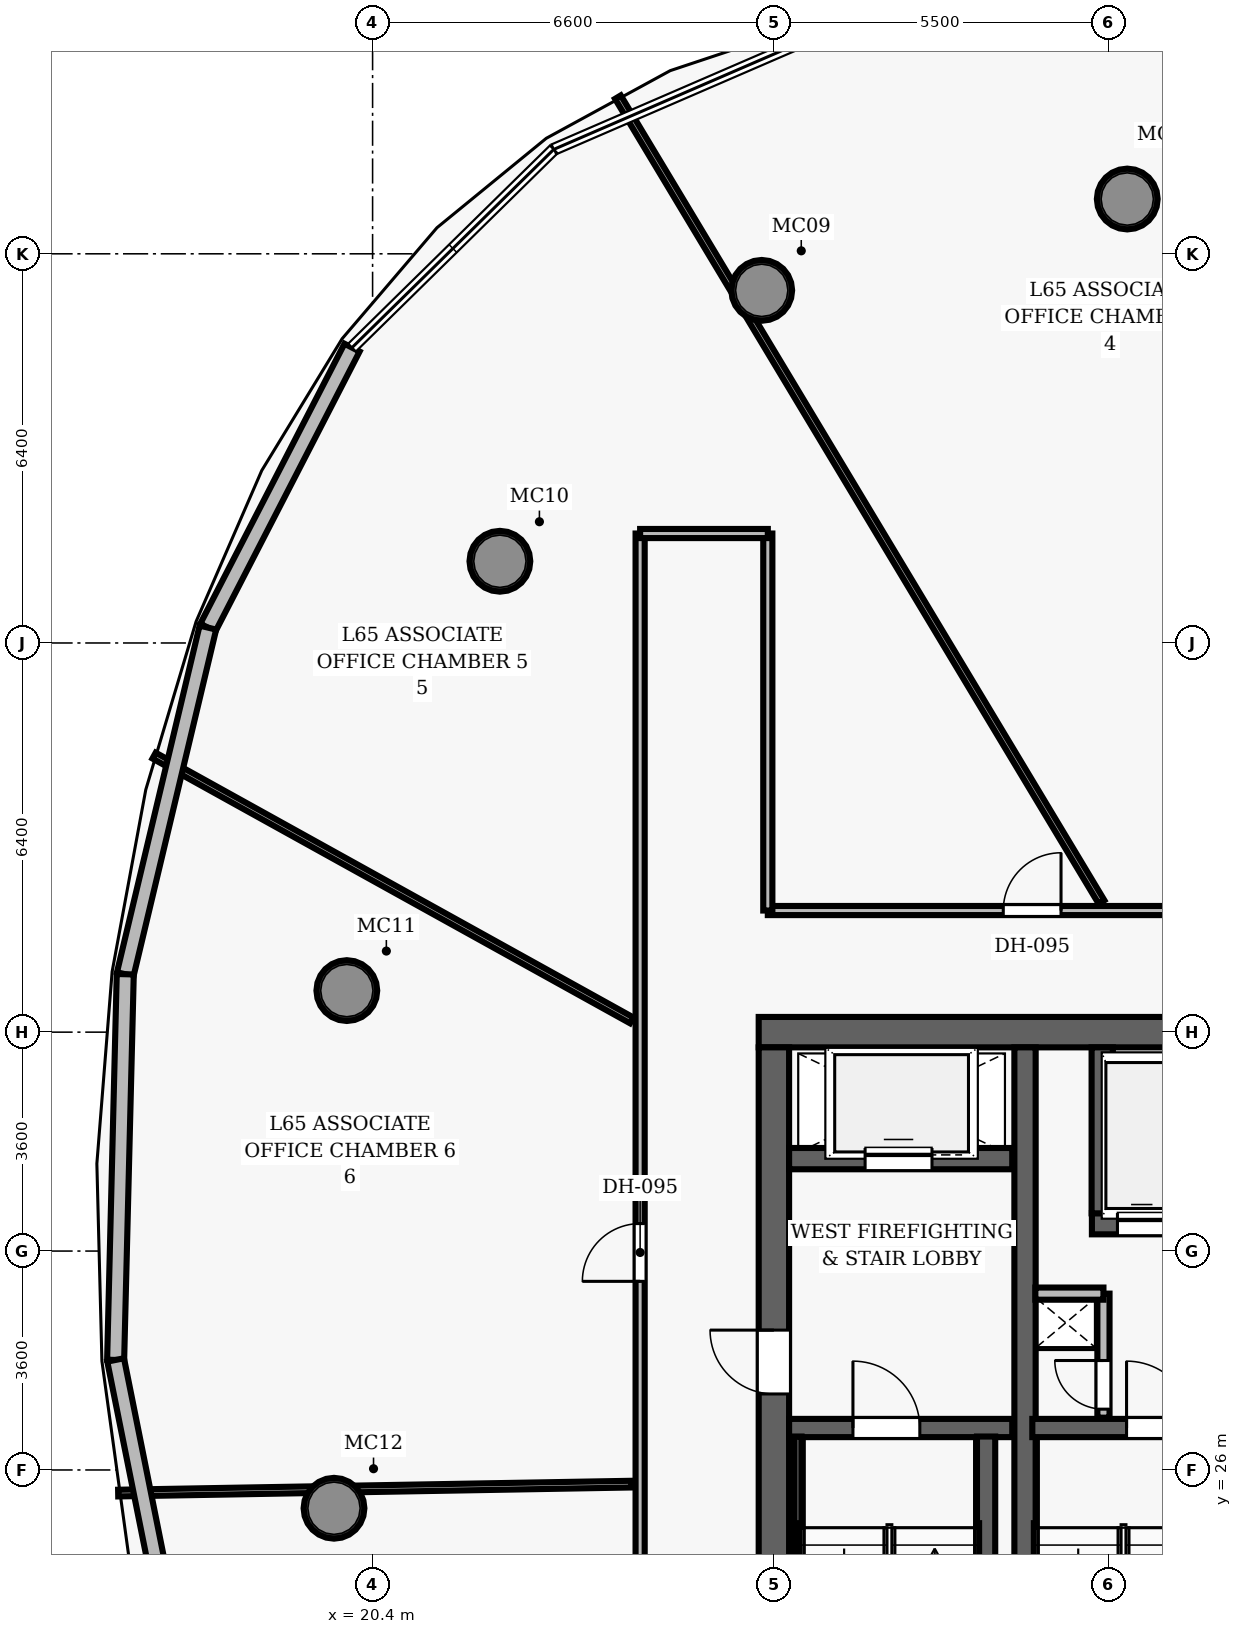
"""IFC4 building model, lengths in metres.
Left out: names, types, materials, properties, quantities, classifications, styles, units other than length and angle.
Written with IfcOpenShell. Run it as: python <this file> out.ifc"""

import sys

from ifc_helpers import new_model, si_unit, direction, frame, frame_2d, origin, origin_2d, place, context, subcontext, project, spatial, rectangle, hollow_circle, extrude, element, fill, save


model = new_model("IFC4")
c1 = context("Model", 3, precision=1e-05, world=origin(), true_north=direction((0.0, 1.0)))
c2 = subcontext(c1, "Body", "Model", "MODEL_VIEW")
j1 = project(units=[si_unit("LENGTHUNIT", "METRE"), si_unit("PLANEANGLEUNIT", "RADIAN")], contexts=[c1])
p1 = place(None, origin())
s1 = spatial("IfcSite", under=j1, at=p1, CompositionType="ELEMENT")
p2 = place(p1, origin())
s2 = spatial("IfcBuilding", under=s1, at=p2, CompositionType="ELEMENT")
p3 = place(p2, frame((0.0, 0.0, 257.45)))
s3 = spatial("IfcBuildingStorey", under=s2, at=p3, CompositionType="ELEMENT", Elevation=257.45)
p4 = place(p3, frame((26.75, 33.2, 0.0), z_axis=(0.0, 0.0, 1.0), x_axis=(1.0, 0.0, 0.0)))
e1 = element("IfcWall", 1, at=p4, inside=s3, PredefinedType="SHEAR", context=c2, shape_type="SweptSolid", body=[
    extrude(rectangle(XDim=22.5, YDim=0.5, at=frame_2d((11.25, 0.0))), origin(), (0.0, 0.0, 1.0), 3.85),
])
p5 = place(p3, frame((27.0, 19.05, 0.0), z_axis=(0.0, 0.0, 1.0), x_axis=(0.0, 1.0, 0.0)))
e2 = element("IfcWall", 2, at=p5, inside=s3, PredefinedType="SHEAR", context=c2, shape_type="SweptSolid", body=[
    extrude(rectangle(XDim=13.9, YDim=0.5, at=frame_2d((6.95, 0.0))), origin(), (0.0, 0.0, 1.0), 3.85),
])
p6 = place(p5, frame((8.2, 0.0, 0.0)))
e3 = element("IfcOpeningElement", 3, at=p6, cuts=e2, PredefinedType="OPENING", context=c2, shape_type="SweptSolid", body=[
    extrude(rectangle(XDim=1.05, YDim=2.15, at=frame_2d((0.525, 1.075))), frame((0.0, 0.26, 0.0), z_axis=(0.0, -1.0, 0.0), x_axis=(1.0, 0.0, 0.0)), (0.0, 0.0, 1.0), 0.52),
])
p7 = place(p3, frame((31.13, 19.05, 0.0), z_axis=(0.0, 0.0, 1.0), x_axis=(0.0, 1.0, 0.0)))
e4 = element("IfcWall", 4, at=p7, inside=s3, PredefinedType="SHEAR", context=c2, shape_type="SweptSolid", body=[
    extrude(rectangle(XDim=13.9, YDim=0.35, at=frame_2d((6.95, 0.0))), origin(), (0.0, 0.0, 1.0), 3.85),
])
for number, where, z_axis, x_axis in (
    (5, (32.812, 46.901, 0.0), (0.0, 0.0, 1.0), (1.0, 0.0, 0.0)),
    (6, (26.8, 45.399, 0.0), (0.0, 0.0, 1.0), (1.0, 0.0, 0.0)),
    (7, (22.494, 40.944, 0.0), (0.0, 0.0, 1.0), (1.0, 0.0, 0.0)),
    (8, (19.976, 33.884, 0.0), (0.0, 0.0, 1.0), (1.0, 0.0, 0.0)),
    (9, (19.765, 25.371, 0.0), (0.0, 0.0, 1.0), (1.0, 0.0, 0.0)),
):
    element("IfcColumn", number, at=place(p3, frame(where, z_axis=z_axis, x_axis=x_axis)), inside=s3, PredefinedType="COLUMN", context=c2, shape_type="SweptSolid", body=[
        extrude(hollow_circle(Radius=0.5, WallThickness=0.045, at=origin_2d()), origin(), (0.0, 0.0, 1.0), 3.85),
    ])
p8 = place(p3, frame((27.25, 26.69, 0.0), z_axis=(0.0, 0.0, 1.0), x_axis=(1.0, 0.0, 0.0)))
e10 = element("IfcWall", 10, at=p8, inside=s3, PredefinedType="SHEAR", context=c2, shape_type="SweptSolid", body=[
    extrude(rectangle(XDim=3.67, YDim=0.3, at=frame_2d((1.835, 0.0))), origin(), (0.0, 0.0, 1.0), 3.85),
])
p9 = place(p8, frame((1.05, 0.0, 0.0)))
e11 = element("IfcOpeningElement", 11, at=p9, cuts=e10, PredefinedType="OPENING", context=c2, shape_type="SweptSolid", body=[
    extrude(rectangle(XDim=1.1, YDim=2.15, at=frame_2d((0.55, 1.075))), frame((0.0, 0.16, 0.0), z_axis=(0.0, -1.0, 0.0), x_axis=(1.0, 0.0, 0.0)), (0.0, 0.0, 1.0), 0.32),
])
p10 = place(p3, frame((30.49, 19.05, 0.0), z_axis=(0.0, 0.0, 1.0), x_axis=(0.0, 1.0, 0.0)))
e12 = element("IfcWall", 12, at=p10, inside=s3, PredefinedType="SHEAR", context=c2, shape_type="SweptSolid", body=[
    extrude(rectangle(XDim=7.5, YDim=0.3, at=frame_2d((3.75, 0.0))), origin(), (0.0, 0.0, 1.0), 3.85),
])
p11 = place(p3, frame((27.395, 19.1, 0.0), z_axis=(0.0, 0.0, 1.0), x_axis=(0.0, 1.0, 0.0)))
e13 = element("IfcWall", 13, at=p11, inside=s3, PredefinedType="SHEAR", context=c2, shape_type="SweptSolid", body=[
    extrude(rectangle(XDim=7.45, YDim=0.12, at=frame_2d((3.725, 0.0))), origin(), (0.0, 0.0, 1.0), 3.85),
])
p12 = place(p3, frame((27.25, 31.12, 0.0), z_axis=(0.0, 0.0, 1.0), x_axis=(1.0, 0.0, 0.0)))
e14 = element("IfcWall", 14, at=p12, inside=s3, PredefinedType="SHEAR", context=c2, shape_type="SweptSolid", body=[
    extrude(rectangle(XDim=3.67, YDim=0.35, at=frame_2d((1.835, 0.0))), origin(), (0.0, 0.0, 1.0), 3.04),
])
p13 = place(p12, frame((1.25, 0.0, 0.0)))
e15 = element("IfcOpeningElement", 15, at=p13, cuts=e14, PredefinedType="OPENING", context=c2, shape_type="SweptSolid", body=[
    extrude(rectangle(XDim=1.1, YDim=2.15, at=frame_2d((0.55, 1.075))), frame((0.0, 0.185, 0.0), z_axis=(0.0, -1.0, 0.0), x_axis=(1.0, 0.0, 0.0)), (0.0, 0.0, 1.0), 0.37),
])
p14 = place(p3, frame((31.25, 26.69, 0.0), z_axis=(0.0, 0.0, 1.0), x_axis=(1.0, 0.0, 0.0)))
e16 = element("IfcWall", 16, at=p14, inside=s3, PredefinedType="SHEAR", context=c2, shape_type="SweptSolid", body=[
    extrude(rectangle(XDim=3.56, YDim=0.3, at=frame_2d((1.78, 0.0))), origin(), (0.0, 0.0, 1.0), 3.85),
])
p15 = place(p14, frame((1.55, 0.0, 0.0)))
e17 = element("IfcOpeningElement", 17, at=p15, cuts=e16, PredefinedType="OPENING", context=c2, shape_type="SweptSolid", body=[
    extrude(rectangle(XDim=1.1, YDim=2.15, at=frame_2d((0.55, 1.075))), frame((0.0, 0.16, 0.0), z_axis=(0.0, -1.0, 0.0), x_axis=(1.0, 0.0, 0.0)), (0.0, 0.0, 1.0), 0.32),
])
p16 = place(p3, frame((32.23, 30.05, 0.0), z_axis=(0.0, 0.0, 1.0), x_axis=(1.0, 0.0, 0.0)))
e18 = element("IfcWall", 18, at=p16, inside=s3, PredefinedType="SHEAR", context=c2, shape_type="SweptSolid", body=[
    extrude(rectangle(XDim=2.41, YDim=0.35, at=frame_2d((1.205, 0.0))), origin(), (0.0, 0.0, 1.0), 3.04),
])
p17 = place(p16, frame((0.42, 0.0, 0.0)))
e19 = element("IfcOpeningElement", 19, at=p17, cuts=e18, PredefinedType="OPENING", context=c2, shape_type="SweptSolid", body=[
    extrude(rectangle(XDim=0.8, YDim=2.15, at=frame_2d((0.4, 1.075))), frame((0.0, 0.185, 0.0), z_axis=(0.0, -1.0, 0.0), x_axis=(1.0, 0.0, 0.0)), (0.0, 0.0, 1.0), 0.37),
])
p18 = place(p16, frame((1.42, 0.0, 0.0)))
e20 = element("IfcOpeningElement", 20, at=p18, cuts=e18, PredefinedType="OPENING", context=c2, shape_type="SweptSolid", body=[
    extrude(rectangle(XDim=0.8, YDim=2.15, at=frame_2d((0.4, 1.075))), frame((0.0, 0.185, 0.0), z_axis=(0.0, -1.0, 0.0), x_axis=(1.0, 0.0, 0.0)), (0.0, 0.0, 1.0), 0.37),
])
p19 = place(p3, frame((32.4, 30.22, 0.0), z_axis=(0.0, 0.0, 1.0), x_axis=(0.0, 1.0, 0.0)))
e21 = element("IfcWall", 21, at=p19, inside=s3, PredefinedType="SHEAR", context=c2, shape_type="SweptSolid", body=[
    extrude(rectangle(XDim=2.73, YDim=0.35, at=frame_2d((1.365, 0.0))), origin(), (0.0, 0.0, 1.0), 3.04),
])
p20 = place(p3, frame((32.42, 26.86, 0.0), z_axis=(0.0, 0.0, 1.0), x_axis=(0.0, 1.0, 0.0)))
e22 = element("IfcWall", 22, at=p20, inside=s3, PredefinedType="PARTITIONING", context=c2, shape_type="SweptSolid", body=[
    extrude(rectangle(XDim=2.04, YDim=0.2, at=frame_2d((1.02, 0.0))), origin(), (0.0, 0.0, 1.0), 3.04),
])
p21 = place(p20, frame((0.14, 0.0, 0.0)))
e23 = element("IfcOpeningElement", 23, at=p21, cuts=e22, PredefinedType="OPENING", context=c2, shape_type="SweptSolid", body=[
    extrude(rectangle(XDim=0.8, YDim=2.05, at=frame_2d((0.4, 1.025))), frame((0.0, 0.11, 0.0), z_axis=(0.0, -1.0, 0.0), x_axis=(1.0, 0.0, 0.0)), (0.0, 0.0, 1.0), 0.22),
])
p22 = place(p3, frame((31.3, 28.9, 0.0), z_axis=(0.0, 0.0, 1.0), x_axis=(1.0, 0.0, 0.0)))
e24 = element("IfcWall", 24, at=p22, inside=s3, PredefinedType="PARTITIONING", context=c2, shape_type="SweptSolid", body=[
    extrude(rectangle(XDim=1.12, YDim=0.2, at=frame_2d((0.56, 0.0))), origin(), (0.0, 0.0, 1.0), 3.04),
])
p23 = place(p3, frame((26.9, 35.2, 0.0), z_axis=(0.0, 0.0, 1.0), x_axis=(1.0, 0.0, 0.0)))
e25 = element("IfcWall", 25, at=p23, inside=s3, PredefinedType="PARTITIONING", context=c2, shape_type="SweptSolid", body=[
    extrude(rectangle(XDim=10.05, YDim=0.15, at=frame_2d((5.025, 0.0))), origin(), (0.0, 0.0, 1.0), 3.04),
])
p24 = place(p23, frame((7.149, 0.0, 0.0)))
e26 = element("IfcOpeningElement", 26, at=p24, cuts=e25, PredefinedType="OPENING", context=c2, shape_type="SweptSolid", body=[
    extrude(rectangle(XDim=0.95, YDim=2.15, at=frame_2d((0.475, 1.075))), frame((0.0, 0.085, 0.0), z_axis=(0.0, -1.0, 0.0), x_axis=(1.0, 0.0, 0.0)), (0.0, 0.0, 1.0), 0.17),
])
p25 = place(p23, frame((3.872, 0.0, 0.0)))
e27 = element("IfcOpeningElement", 27, at=p25, cuts=e25, PredefinedType="OPENING", context=c2, shape_type="SweptSolid", body=[
    extrude(rectangle(XDim=0.95, YDim=2.15, at=frame_2d((0.475, 1.075))), frame((0.0, 0.085, 0.0), z_axis=(0.0, -1.0, 0.0), x_axis=(1.0, 0.0, 0.0)), (0.0, 0.0, 1.0), 0.17),
])
p26 = place(p3, frame((24.8, 11.321, 0.0), z_axis=(0.0, 0.0, 1.0), x_axis=(0.0, 1.0, 0.0)))
e28 = element("IfcWall", 28, at=p26, inside=s3, PredefinedType="PARTITIONING", context=c2, shape_type="SweptSolid", body=[
    extrude(rectangle(XDim=30.079, YDim=0.15, at=frame_2d((15.039, 0.0))), origin(), (0.0, 0.0, 1.0), 3.04),
])
p27 = place(p26, frame((17.781, 0.0, 0.0)))
e29 = element("IfcOpeningElement", 29, at=p27, cuts=e28, PredefinedType="OPENING", context=c2, shape_type="SweptSolid", body=[
    extrude(rectangle(XDim=0.95, YDim=2.15, at=frame_2d((0.475, 1.075))), frame((0.0, 0.085, 0.0), z_axis=(0.0, -1.0, 0.0), x_axis=(1.0, 0.0, 0.0)), (0.0, 0.0, 1.0), 0.17),
])
p28 = place(p26, frame((11.339, 0.0, 0.0)))
e30 = element("IfcOpeningElement", 30, at=p28, cuts=e28, PredefinedType="OPENING", context=c2, shape_type="SweptSolid", body=[
    extrude(rectangle(XDim=0.95, YDim=2.15, at=frame_2d((0.475, 1.075))), frame((0.0, 0.085, 0.0), z_axis=(0.0, -1.0, 0.0), x_axis=(1.0, 0.0, 0.0)), (0.0, 0.0, 1.0), 0.17),
])
p29 = place(p3, frame((26.9, 35.2, 0.0), z_axis=(0.0, 0.0, 1.0), x_axis=(0.0, 1.0, 0.0)))
e31 = element("IfcWall", 31, at=p29, inside=s3, PredefinedType="PARTITIONING", context=c2, shape_type="SweptSolid", body=[
    extrude(rectangle(XDim=6.2, YDim=0.15, at=frame_2d((3.1, 0.0))), origin(), (0.0, 0.0, 1.0), 3.04),
])
p30 = place(p3, frame((24.8, 41.4, 0.0), z_axis=(0.0, 0.0, 1.0), x_axis=(1.0, 0.0, 0.0)))
e32 = element("IfcWall", 32, at=p30, inside=s3, PredefinedType="PARTITIONING", context=c2, shape_type="SweptSolid", body=[
    extrude(rectangle(XDim=2.1, YDim=0.15, at=frame_2d((1.05, 0.0))), origin(), (0.0, 0.0, 1.0), 3.04),
])
p31 = place(p3, frame((32.388, 35.34, 0.0), z_axis=(0.0, 0.0, 1.0), x_axis=(-0.515039699053, 0.857166324817, 0.0)))
e33 = element("IfcWall", 33, at=p31, inside=s3, PredefinedType="PARTITIONING", context=c2, shape_type="SweptSolid", body=[
    extrude(rectangle(XDim=15.442, YDim=0.11, at=frame_2d((7.721, 0.0))), origin(), (0.0, 0.0, 1.0), 3.04),
])
p32 = place(p3, frame((24.66, 33.395, 0.0), z_axis=(0.0, 0.0, 1.0), x_axis=(-0.874619863553, 0.484809338069, 0.0)))
e34 = element("IfcWall", 34, at=p32, inside=s3, PredefinedType="PARTITIONING", context=c2, shape_type="SweptSolid", body=[
    extrude(rectangle(XDim=8.979, YDim=0.11, at=frame_2d((4.49, 0.0))), origin(), (0.0, 0.0, 1.0), 3.04),
])
p33 = place(p3, frame((24.66, 25.767, 0.0), z_axis=(0.0, 0.0, 1.0), x_axis=(-0.99984806608, -0.017431143282, 0.0)))
e35 = element("IfcWall", 35, at=p33, inside=s3, PredefinedType="PARTITIONING", context=c2, shape_type="SweptSolid", body=[
    extrude(rectangle(XDim=8.446, YDim=0.11, at=frame_2d((4.223, 0.0))), origin(), (0.0, 0.0, 1.0), 3.04),
])
p34 = place(p3, frame((32.806, 50.029, 0.0), z_axis=(0.0, 0.0, 1.0), x_axis=(0.98850473066, -0.151189938364, 0.0)))
e36 = element("IfcWall", 36, at=p34, inside=s3, PredefinedType="SOLIDWALL", context=c2, shape_type="SweptSolid", body=[
    extrude(rectangle(XDim=5.86, YDim=0.28, at=frame_2d((2.93, 0.0))), origin(), (0.0, 0.0, 1.0), 3.625),
])
p35 = place(p3, frame((17.691, 39.853, 0.0), z_axis=(0.0, 0.0, 1.0), x_axis=(0.457797416995, 0.889056536443, 0.0)))
e37 = element("IfcWall", 37, at=p35, inside=s3, PredefinedType="SOLIDWALL", context=c2, shape_type="SweptSolid", body=[
    extrude(rectangle(XDim=5.179, YDim=0.28, at=frame_2d((2.59, 0.0))), origin(), (0.0, 0.0, 1.0), 3.625),
])
p36 = place(p3, frame((16.332, 34.153, 0.0), z_axis=(0.0, 0.0, 1.0), x_axis=(0.231855210835, 0.97275030774, 0.0)))
e38 = element("IfcWall", 38, at=p36, inside=s3, PredefinedType="SOLIDWALL", context=c2, shape_type="SweptSolid", body=[
    extrude(rectangle(XDim=5.86, YDim=0.28, at=frame_2d((2.93, 0.0))), origin(), (0.0, 0.0, 1.0), 3.625),
])
p37 = place(p3, frame((16.174, 27.809, 0.0), z_axis=(0.0, 0.0, 1.0), x_axis=(0.024932590226, 0.999689134654, 0.0)))
e39 = element("IfcWall", 39, at=p37, inside=s3, PredefinedType="SOLIDWALL", context=c2, shape_type="SweptSolid", body=[
    extrude(rectangle(XDim=6.345, YDim=0.28, at=frame_2d((3.173, 0.0))), origin(), (0.0, 0.0, 1.0), 3.625),
])
p38 = place(p3, frame((17.458, 21.411, 0.0), z_axis=(0.0, 0.0, 1.0), x_axis=(-0.196662861998, 0.98047117179, 0.0)))
e40 = element("IfcWall", 40, at=p38, inside=s3, PredefinedType="SOLIDWALL", context=c2, shape_type="SweptSolid", body=[
    extrude(rectangle(XDim=6.526, YDim=0.28, at=frame_2d((3.263, 0.0))), origin(), (0.0, 0.0, 1.0), 3.625),
])
p39 = place(p9, origin())
e41 = element("IfcDoor", 41, at=p39, inside=s3, OperationType="SINGLE_SWING_LEFT", PredefinedType="DOOR", context=c2, shape_type="SweptSolid", body=[
    extrude(rectangle(XDim=1.1, YDim=2.15, at=frame_2d((0.55, 1.075))), frame((0.0, 0.025, 0.0), z_axis=(0.0, -1.0, 0.0), x_axis=(1.0, 0.0, 0.0)), (0.0, 0.0, 1.0), 0.05),
])
fill(e11, e41)
p40 = place(p6, origin())
e42 = element("IfcDoor", 42, at=p40, inside=s3, OperationType="SINGLE_SWING_RIGHT", PredefinedType="DOOR", context=c2, shape_type="SweptSolid", body=[
    extrude(rectangle(XDim=1.05, YDim=2.15, at=frame_2d((0.525, 1.075))), frame((0.0, 0.025, 0.0), z_axis=(0.0, -1.0, 0.0), x_axis=(1.0, 0.0, 0.0)), (0.0, 0.0, 1.0), 0.05),
])
fill(e3, e42)
p41 = place(p15, origin())
e43 = element("IfcDoor", 43, at=p41, inside=s3, OperationType="SINGLE_SWING_LEFT", PredefinedType="DOOR", context=c2, shape_type="SweptSolid", body=[
    extrude(rectangle(XDim=1.1, YDim=2.15, at=frame_2d((0.55, 1.075))), frame((0.0, 0.025, 0.0), z_axis=(0.0, -1.0, 0.0), x_axis=(1.0, 0.0, 0.0)), (0.0, 0.0, 1.0), 0.05),
])
fill(e17, e43)
p42 = place(p21, origin())
e44 = element("IfcDoor", 44, at=p42, inside=s3, OperationType="SINGLE_SWING_RIGHT", PredefinedType="DOOR", context=c2, shape_type="SweptSolid", body=[
    extrude(rectangle(XDim=0.8, YDim=2.05, at=frame_2d((0.4, 1.025))), frame((0.0, 0.025, 0.0), z_axis=(0.0, -1.0, 0.0), x_axis=(1.0, 0.0, 0.0)), (0.0, 0.0, 1.0), 0.05),
])
fill(e23, e44)
p43 = place(p25, origin())
e45 = element("IfcDoor", 45, at=p43, inside=s3, OperationType="SINGLE_SWING_RIGHT", PredefinedType="DOOR", context=c2, shape_type="SweptSolid", body=[
    extrude(rectangle(XDim=0.95, YDim=2.15, at=frame_2d((0.475, 1.075))), frame((0.0, 0.025, 0.0), z_axis=(0.0, -1.0, 0.0), x_axis=(1.0, 0.0, 0.0)), (0.0, 0.0, 1.0), 0.05),
])
fill(e27, e45)
p44 = place(p27, origin())
e46 = element("IfcDoor", 46, at=p44, inside=s3, OperationType="SINGLE_SWING_LEFT", PredefinedType="DOOR", context=c2, shape_type="SweptSolid", body=[
    extrude(rectangle(XDim=0.95, YDim=2.15, at=frame_2d((0.475, 1.075))), frame((0.0, 0.025, 0.0), z_axis=(0.0, -1.0, 0.0), x_axis=(1.0, 0.0, 0.0)), (0.0, 0.0, 1.0), 0.05),
])
fill(e29, e46)
p45 = place(p13, origin())
e47 = element("IfcDoor", 47, at=p45, inside=s3, OperationType="SLIDING_TO_LEFT", PredefinedType="DOOR", context=c2, shape_type="SweptSolid", body=[
    extrude(rectangle(XDim=1.1, YDim=2.15, at=frame_2d((0.55, 1.075))), frame((0.0, 0.025, 0.0), z_axis=(0.0, -1.0, 0.0), x_axis=(1.0, 0.0, 0.0)), (0.0, 0.0, 1.0), 0.05),
])
fill(e15, e47)
p46 = place(p17, origin())
e48 = element("IfcDoor", 48, at=p46, inside=s3, OperationType="SLIDING_TO_LEFT", PredefinedType="DOOR", context=c2, shape_type="SweptSolid", body=[
    extrude(rectangle(XDim=0.8, YDim=2.15, at=frame_2d((0.4, 1.075))), frame((0.0, 0.025, 0.0), z_axis=(0.0, -1.0, 0.0), x_axis=(1.0, 0.0, 0.0)), (0.0, 0.0, 1.0), 0.05),
])
fill(e19, e48)
save(model, sys.argv[1])
